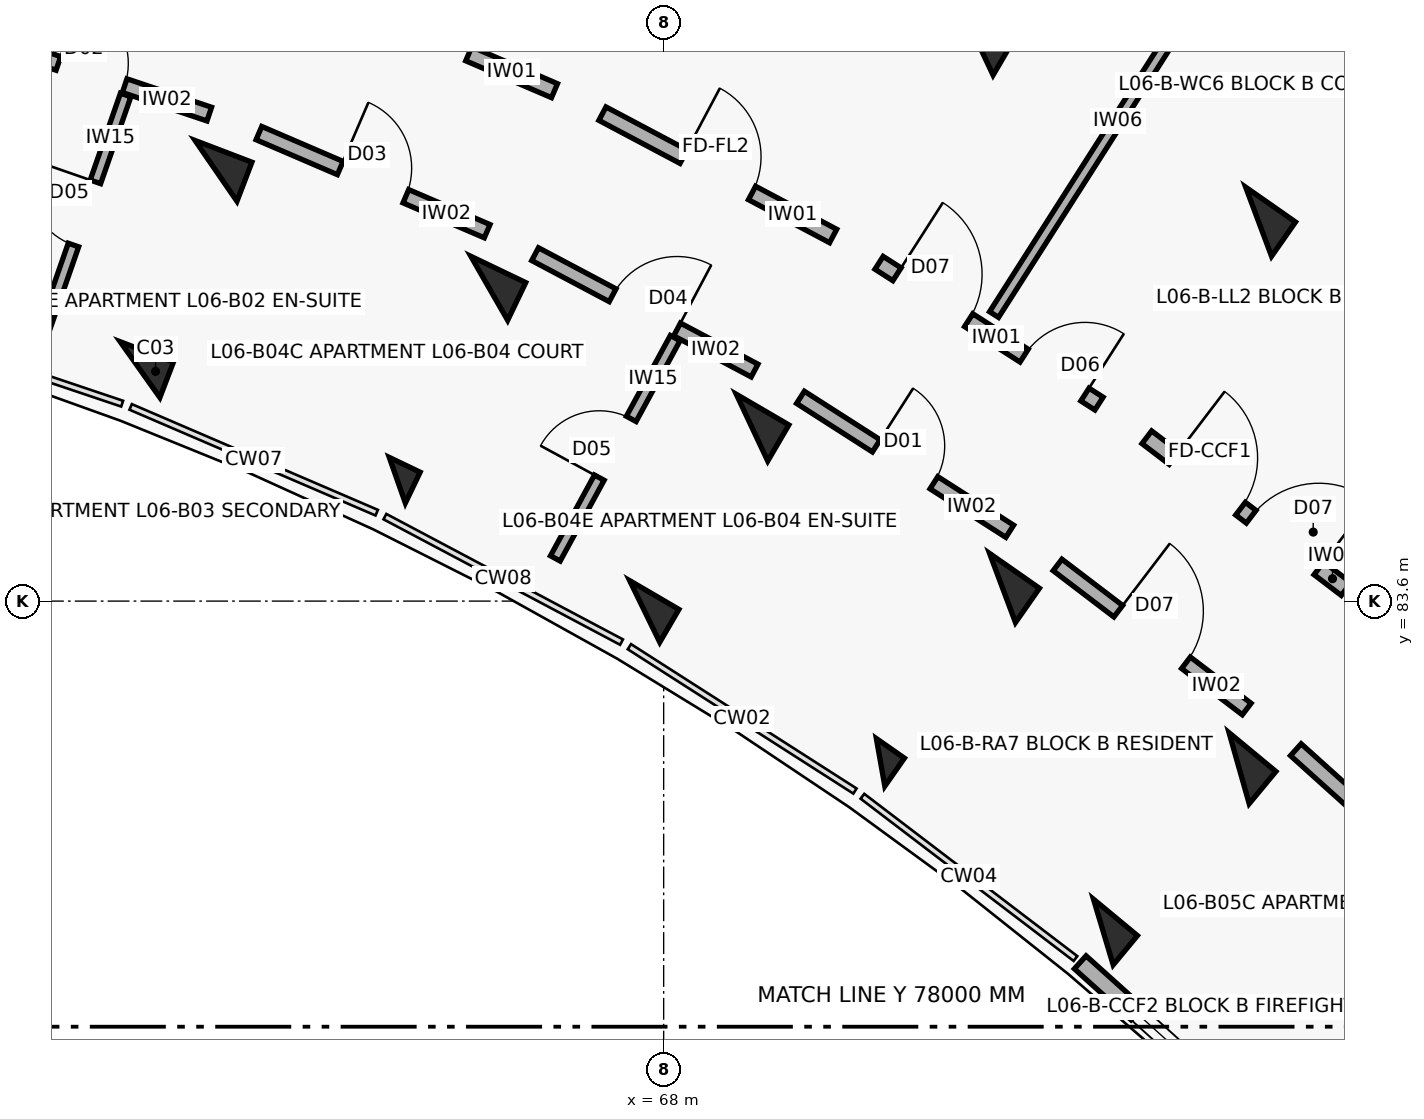
"""IFC4 building model, lengths in metres.
Left out: names, types, materials, properties, quantities, classifications, styles, units other than length and angle.
Written with IfcOpenShell. Run it as: python <this file> out.ifc"""

import sys

from ifc_helpers import new_model, si_unit, direction, frame, frame_2d, origin, origin_2d, place, context, subcontext, project, spatial, rectangle, extrude, element, fill, save


model = new_model("IFC4")
c1 = context("Model", 3, precision=1e-05, world=origin(), true_north=direction((0.0, 1.0)))
c2 = subcontext(c1, "Body", "Model", "MODEL_VIEW")
j1 = project(units=[si_unit("LENGTHUNIT", "METRE"), si_unit("PLANEANGLEUNIT", "RADIAN")], contexts=[c1])
p1 = place(None, origin())
s1 = spatial("IfcSite", under=j1, at=p1, CompositionType="ELEMENT")
p2 = place(p1, origin())
s2 = spatial("IfcBuilding", under=s1, at=p2, CompositionType="ELEMENT")
p3 = place(p2, frame((0.0, 0.0, 20.5)))
s3 = spatial("IfcBuildingStorey", under=s2, at=p3, CompositionType="ELEMENT", Elevation=20.5)
p4 = place(p3, frame((61.111, 86.646, 0.0), z_axis=(0.0, 0.0, 1.0), x_axis=(0.357064076459, 0.934079892355, 0.0)))
e1 = element("IfcColumn", 1, at=p4, inside=s3, PredefinedType="COLUMN", context=c2, shape_type="SweptSolid", body=[
    extrude(rectangle(XDim=0.5, YDim=0.75, at=origin_2d()), origin(), (0.0, 0.0, 1.0), 3.1),
])
p5 = place(p3, frame((62.111, 89.261, 0.0), z_axis=(0.0, 0.0, 1.0), x_axis=(0.357064076459, 0.934079892355, 0.0)))
e2 = element("IfcColumn", 2, at=p5, inside=s3, PredefinedType="COLUMN", context=c2, shape_type="SweptSolid", body=[
    extrude(rectangle(XDim=0.55, YDim=0.8, at=origin_2d()), origin(), (0.0, 0.0, 1.0), 3.1),
])
p6 = place(p3, frame((64.496, 85.191, 0.0), z_axis=(0.0, 0.0, 1.0), x_axis=(0.432085748802, 0.901832526405, 0.0)))
e3 = element("IfcColumn", 3, at=p6, inside=s3, PredefinedType="COLUMN", context=c2, shape_type="SweptSolid", body=[
    extrude(rectangle(XDim=0.45, YDim=0.45, at=origin_2d()), origin(), (0.0, 0.0, 1.0), 3.1),
])
p7 = place(p3, frame((65.706, 87.716, 0.0), z_axis=(0.0, 0.0, 1.0), x_axis=(0.432085748802, 0.901832526405, 0.0)))
e4 = element("IfcColumn", 4, at=p7, inside=s3, PredefinedType="COLUMN", context=c2, shape_type="SweptSolid", body=[
    extrude(rectangle(XDim=0.55, YDim=0.8, at=origin_2d()), origin(), (0.0, 0.0, 1.0), 3.1),
])
p8 = place(p3, frame((67.751, 83.464, 0.0), z_axis=(0.0, 0.0, 1.0), x_axis=(0.504226211181, 0.863571611366, 0.0)))
e5 = element("IfcColumn", 5, at=p8, inside=s3, PredefinedType="COLUMN", context=c2, shape_type="SweptSolid", body=[
    extrude(rectangle(XDim=0.5, YDim=0.75, at=origin_2d()), origin(), (0.0, 0.0, 1.0), 3.1),
])
for number, where, z_axis, x_axis in (
    (6, (69.163, 85.882, 0.0), (0.0, 0.0, 1.0), (0.504, 0.864, 0.0)),
    (7, (72.127, 90.96, 0.0), (0.0, 0.0, 1.0), (0.504, 0.864, 0.0)),
):
    element("IfcColumn", number, at=place(p3, frame(where, z_axis=z_axis, x_axis=x_axis)), inside=s3, PredefinedType="COLUMN", context=c2, shape_type="SweptSolid", body=[
        extrude(rectangle(XDim=0.55, YDim=0.8, at=origin_2d()), origin(), (0.0, 0.0, 1.0), 3.1),
    ])
p9 = place(p3, frame((70.854, 81.478, 0.0), z_axis=(0.0, 0.0, 1.0), x_axis=(0.573004420611, 0.819552276527, 0.0)))
e8 = element("IfcColumn", 8, at=p9, inside=s3, PredefinedType="COLUMN", context=c2, shape_type="SweptSolid", body=[
    extrude(rectangle(XDim=0.45, YDim=0.45, at=origin_2d()), origin(), (0.0, 0.0, 1.0), 3.1),
])
for number, where, z_axis, x_axis in (
    (9, (72.458, 83.773, 0.0), (0.0, 0.0, 1.0), (0.573, 0.82, 0.0)),
    (10, (75.828, 88.592, 0.0), (0.0, 0.0, 1.0), (0.573, 0.82, 0.0)),
):
    element("IfcColumn", number, at=place(p3, frame(where, z_axis=z_axis, x_axis=x_axis)), inside=s3, PredefinedType="COLUMN", context=c2, shape_type="SweptSolid", body=[
        extrude(rectangle(XDim=0.55, YDim=0.8, at=origin_2d()), origin(), (0.0, 0.0, 1.0), 3.1),
    ])
p10 = place(p3, frame((73.785, 79.245, 0.0), z_axis=(0.0, 0.0, 1.0), x_axis=(0.637961754089, 0.770068049148, 0.0)))
e11 = element("IfcColumn", 11, at=p10, inside=s3, PredefinedType="COLUMN", context=c2, shape_type="SweptSolid", body=[
    extrude(rectangle(XDim=0.5, YDim=0.75, at=origin_2d()), origin(), (0.0, 0.0, 1.0), 3.1),
])
p11 = place(p3, frame((75.571, 81.402, 0.0), z_axis=(0.0, 0.0, 1.0), x_axis=(0.637961754089, 0.770068049148, 0.0)))
e12 = element("IfcColumn", 12, at=p11, inside=s3, PredefinedType="COLUMN", context=c2, shape_type="SweptSolid", body=[
    extrude(rectangle(XDim=0.55, YDim=0.8, at=origin_2d()), origin(), (0.0, 0.0, 1.0), 3.1),
])
p12 = place(p3, frame((73.481, 78.847, 0.0), z_axis=(0.0, 0.0, 1.0), x_axis=(0.743385092197, -0.668863666751, 0.0)))
e13 = element("IfcWall", 13, at=p12, inside=s3, PredefinedType="SOLIDWALL", context=c2, shape_type="SweptSolid", body=[
    extrude(rectangle(XDim=3.604, YDim=0.23, at=frame_2d((1.802, 0.0))), origin(), (0.0, 0.0, 1.0), 2.25),
])
p13 = place(p12, frame((1.002, 0.0, 0.32)))
e14 = element("IfcOpeningElement", 14, at=p13, cuts=e13, PredefinedType="OPENING", context=c2, shape_type="SweptSolid", body=[
    extrude(rectangle(XDim=1.6, YDim=1.5, at=frame_2d((0.8, 0.75))), frame((0.0, 0.125, 0.0), z_axis=(0.0, -1.0, 0.0), x_axis=(1.0, 0.0, 0.0)), (0.0, 0.0, 1.0), 0.25),
])
p14 = place(p3, frame((58.923, 91.049, 0.0), z_axis=(0.0, 0.0, 1.0), x_axis=(0.94787351033, -0.318646839643, 0.0)))
e15 = element("IfcWall", 15, at=p14, inside=s3, PredefinedType="SOLIDWALL", context=c2, shape_type="SweptSolid", body=[
    extrude(rectangle(XDim=3.269, YDim=0.19, at=frame_2d((1.634, 0.0))), origin(), (0.0, 0.0, 1.0), 2.08),
])
p15 = place(p14, frame((1.174, 0.0, 0.0)))
e16 = element("IfcOpeningElement", 16, at=p15, cuts=e15, PredefinedType="OPENING", context=c2, shape_type="SweptSolid", body=[
    extrude(rectangle(XDim=0.92, YDim=2.1, at=frame_2d((0.46, 1.05))), frame((0.0, 0.105, 0.0), z_axis=(0.0, -1.0, 0.0), x_axis=(1.0, 0.0, 0.0)), (0.0, 0.0, 1.0), 0.21),
])
p16 = place(p3, frame((59.837, 87.143, 0.0), z_axis=(0.0, 0.0, 1.0), x_axis=(0.328629662527, 0.944458863534, 0.0)))
e17 = element("IfcWall", 17, at=p16, inside=s3, PredefinedType="PARTITIONING", context=c2, shape_type="SweptSolid", body=[
    extrude(rectangle(XDim=3.3, YDim=0.145, at=frame_2d((1.65, 0.0))), origin(), (0.0, 0.0, 1.0), 2.08),
])
p17 = place(p16, frame((1.21, 0.0, 0.0)))
e18 = element("IfcOpeningElement", 18, at=p17, cuts=e17, PredefinedType="OPENING", context=c2, shape_type="SweptSolid", body=[
    extrude(rectangle(XDim=0.88, YDim=2.1, at=frame_2d((0.44, 1.05))), frame((0.0, 0.083, 0.0), z_axis=(0.0, -1.0, 0.0), x_axis=(1.0, 0.0, 0.0)), (0.0, 0.0, 1.0), 0.165),
])
p18 = place(p3, frame((63.407, 91.673, 0.0), z_axis=(0.0, 0.0, 1.0), x_axis=(0.918718172399, -0.394913813008, 0.0)))
e19 = element("IfcWall", 19, at=p18, inside=s3, PredefinedType="SOLIDWALL", context=c2, shape_type="SweptSolid", body=[
    extrude(rectangle(XDim=3.436, YDim=0.2, at=frame_2d((1.718, 0.0))), origin(), (0.0, 0.0, 1.0), 2.08),
])
p19 = place(p18, frame((1.228, 0.0, 0.0)))
e20 = element("IfcOpeningElement", 20, at=p19, cuts=e19, PredefinedType="OPENING", context=c2, shape_type="SweptSolid", body=[
    extrude(rectangle(XDim=0.98, YDim=2.15, at=frame_2d((0.49, 1.075))), frame((0.0, 0.11, 0.0), z_axis=(0.0, -1.0, 0.0), x_axis=(1.0, 0.0, 0.0)), (0.0, 0.0, 1.0), 0.22),
])
p20 = place(p3, frame((62.675, 89.758, 0.0), z_axis=(0.0, 0.0, 1.0), x_axis=(0.918723391052, -0.394901672235, 0.0)))
e21 = element("IfcWall", 21, at=p20, inside=s3, PredefinedType="SOLIDWALL", context=c2, shape_type="SweptSolid", body=[
    extrude(rectangle(XDim=3.269, YDim=0.19, at=frame_2d((1.634, 0.0))), origin(), (0.0, 0.0, 1.0), 2.08),
])
p21 = place(p20, frame((1.164, 0.0, 0.0)))
e22 = element("IfcOpeningElement", 22, at=p21, cuts=e21, PredefinedType="OPENING", context=c2, shape_type="SweptSolid", body=[
    extrude(rectangle(XDim=0.94, YDim=2.1, at=frame_2d((0.47, 1.05))), frame((0.0, 0.105, 0.0), z_axis=(0.0, -1.0, 0.0), x_axis=(1.0, 0.0, 0.0)), (0.0, 0.0, 1.0), 0.21),
])
p22 = place(p3, frame((67.194, 90.014, 0.0), z_axis=(0.0, 0.0, 1.0), x_axis=(0.883410853063, -0.468599258099, 0.0)))
e23 = element("IfcWall", 23, at=p22, inside=s3, PredefinedType="SOLIDWALL", context=c2, shape_type="SweptSolid", body=[
    extrude(rectangle(XDim=3.436, YDim=0.2, at=frame_2d((1.718, 0.0))), origin(), (0.0, 0.0, 1.0), 2.08),
])
p23 = place(p22, frame((1.208, 0.0, 0.0)))
e24 = element("IfcOpeningElement", 24, at=p23, cuts=e23, PredefinedType="OPENING", context=c2, shape_type="SweptSolid", body=[
    extrude(rectangle(XDim=1.02, YDim=2.15, at=frame_2d((0.51, 1.075))), frame((0.0, 0.11, 0.0), z_axis=(0.0, -1.0, 0.0), x_axis=(1.0, 0.0, 0.0)), (0.0, 0.0, 1.0), 0.22),
])
p24 = place(p3, frame((66.309, 88.165, 0.0), z_axis=(0.0, 0.0, 1.0), x_axis=(0.883444301944, -0.468536194293, 0.0)))
e25 = element("IfcWall", 25, at=p24, inside=s3, PredefinedType="SOLIDWALL", context=c2, shape_type="SweptSolid", body=[
    extrude(rectangle(XDim=3.269, YDim=0.19, at=frame_2d((1.634, 0.0))), origin(), (0.0, 0.0, 1.0), 2.08),
])
p25 = place(p24, frame((1.154, 0.0, 0.0)))
e26 = element("IfcOpeningElement", 26, at=p25, cuts=e25, PredefinedType="OPENING", context=c2, shape_type="SweptSolid", body=[
    extrude(rectangle(XDim=0.96, YDim=2.1, at=frame_2d((0.48, 1.05))), frame((0.0, 0.105, 0.0), z_axis=(0.0, -1.0, 0.0), x_axis=(1.0, 0.0, 0.0)), (0.0, 0.0, 1.0), 0.21),
])
p26 = place(p3, frame((66.575, 84.162, 0.0), z_axis=(0.0, 0.0, 1.0), x_axis=(0.477841058477, 0.878446311868, 0.0)))
e27 = element("IfcWall", 27, at=p26, inside=s3, PredefinedType="PARTITIONING", context=c2, shape_type="SweptSolid", body=[
    extrude(rectangle(XDim=3.3, YDim=0.145, at=frame_2d((1.65, 0.0))), origin(), (0.0, 0.0, 1.0), 2.08),
])
p27 = place(p26, frame((1.21, 0.0, 0.0)))
e28 = element("IfcOpeningElement", 28, at=p27, cuts=e27, PredefinedType="OPENING", context=c2, shape_type="SweptSolid", body=[
    extrude(rectangle(XDim=0.88, YDim=2.1, at=frame_2d((0.44, 1.05))), frame((0.0, 0.083, 0.0), z_axis=(0.0, -1.0, 0.0), x_axis=(1.0, 0.0, 0.0)), (0.0, 0.0, 1.0), 0.165),
])
p28 = place(p3, frame((70.834, 88.051, 0.0), z_axis=(0.0, 0.0, 1.0), x_axis=(0.842257205985, -0.539075874963, 0.0)))
e29 = element("IfcWall", 29, at=p28, inside=s3, PredefinedType="SOLIDWALL", context=c2, shape_type="SweptSolid", body=[
    extrude(rectangle(XDim=3.436, YDim=0.2, at=frame_2d((1.718, 0.0))), origin(), (0.0, 0.0, 1.0), 2.08),
])
p29 = place(p28, frame((0.28, 0.0, 0.0)))
e30 = element("IfcOpeningElement", 30, at=p29, cuts=e29, PredefinedType="OPENING", context=c2, shape_type="SweptSolid", body=[
    extrude(rectangle(XDim=1.12, YDim=2.15, at=frame_2d((0.56, 1.075))), frame((0.0, 0.11, 0.0), z_axis=(0.0, -1.0, 0.0), x_axis=(1.0, 0.0, 0.0)), (0.0, 0.0, 1.0), 0.22),
])
p30 = place(p28, frame((2.266, 0.0, 0.0)))
e31 = element("IfcOpeningElement", 31, at=p30, cuts=e29, PredefinedType="OPENING", context=c2, shape_type="SweptSolid", body=[
    extrude(rectangle(XDim=0.95, YDim=2.1, at=frame_2d((0.475, 1.05))), frame((0.0, 0.11, 0.0), z_axis=(0.0, -1.0, 0.0), x_axis=(1.0, 0.0, 0.0)), (0.0, 0.0, 1.0), 0.22),
])
p31 = place(p3, frame((69.8, 86.281, 0.0), z_axis=(0.0, 0.0, 1.0), x_axis=(0.842225276846, -0.539125758095, 0.0)))
e32 = element("IfcWall", 32, at=p31, inside=s3, PredefinedType="SOLIDWALL", context=c2, shape_type="SweptSolid", body=[
    extrude(rectangle(XDim=3.269, YDim=0.19, at=frame_2d((1.634, 0.0))), origin(), (0.0, 0.0, 1.0), 2.08),
])
p32 = place(p31, frame((1.184, 0.0, 0.0)))
e33 = element("IfcOpeningElement", 33, at=p32, cuts=e32, PredefinedType="OPENING", context=c2, shape_type="SweptSolid", body=[
    extrude(rectangle(XDim=0.9, YDim=2.1, at=frame_2d((0.45, 1.05))), frame((0.0, 0.105, 0.0), z_axis=(0.0, -1.0, 0.0), x_axis=(1.0, 0.0, 0.0)), (0.0, 0.0, 1.0), 0.21),
])
p33 = place(p3, frame((72.347, 87.37, 0.0), z_axis=(0.0, 0.0, 1.0), x_axis=(0.537777309481, 0.843086926365, 0.0)))
e34 = element("IfcWall", 34, at=p33, inside=s3, PredefinedType="PARTITIONING", context=c2, shape_type="SweptSolid", body=[
    extrude(rectangle(XDim=7.95, YDim=0.14, at=frame_2d((3.975, 0.0))), origin(), (0.0, 0.0, 1.0), 2.08),
])
p34 = place(p33, frame((6.05, 0.0, 0.0)))
e35 = element("IfcOpeningElement", 35, at=p34, cuts=e34, PredefinedType="OPENING", context=c2, shape_type="SweptSolid", body=[
    extrude(rectangle(XDim=0.92, YDim=2.1, at=frame_2d((0.46, 1.05))), frame((0.0, 0.08, 0.0), z_axis=(0.0, -1.0, 0.0), x_axis=(1.0, 0.0, 0.0)), (0.0, 0.0, 1.0), 0.16),
])
p35 = place(p3, frame((74.357, 85.756, 0.0), z_axis=(0.0, 0.0, 1.0), x_axis=(0.795498026433, -0.605956178235, 0.0)))
e36 = element("IfcWall", 36, at=p35, inside=s3, PredefinedType="SOLIDWALL", context=c2, shape_type="SweptSolid", body=[
    extrude(rectangle(XDim=3.296, YDim=0.21, at=frame_2d((1.648, 0.0))), origin(), (0.0, 0.0, 1.0), 2.08),
])
p36 = place(p35, frame((0.45, 0.0, 0.0)))
e37 = element("IfcOpeningElement", 37, at=p36, cuts=e36, PredefinedType="OPENING", context=c2, shape_type="SweptSolid", body=[
    extrude(rectangle(XDim=1.1, YDim=2.15, at=frame_2d((0.55, 1.075))), frame((0.0, 0.115, 0.0), z_axis=(0.0, -1.0, 0.0), x_axis=(1.0, 0.0, 0.0)), (0.0, 0.0, 1.0), 0.23),
])
p37 = place(p35, frame((1.726, 0.0, 0.0)))
e38 = element("IfcOpeningElement", 38, at=p37, cuts=e36, PredefinedType="OPENING", context=c2, shape_type="SweptSolid", body=[
    extrude(rectangle(XDim=1.12, YDim=2.15, at=frame_2d((0.56, 1.075))), frame((0.0, 0.115, 0.0), z_axis=(0.0, -1.0, 0.0), x_axis=(1.0, 0.0, 0.0)), (0.0, 0.0, 1.0), 0.23),
])
p38 = place(p3, frame((73.182, 84.076, 0.0), z_axis=(0.0, 0.0, 1.0), x_axis=(0.795501577908, -0.605951515838, 0.0)))
e39 = element("IfcWall", 39, at=p38, inside=s3, PredefinedType="SOLIDWALL", context=c2, shape_type="SweptSolid", body=[
    extrude(rectangle(XDim=3.129, YDim=0.19, at=frame_2d((1.564, 0.0))), origin(), (0.0, 0.0, 1.0), 2.08),
])
p39 = place(p38, frame((1.004, 0.0, 0.0)))
e40 = element("IfcOpeningElement", 40, at=p39, cuts=e39, PredefinedType="OPENING", context=c2, shape_type="SweptSolid", body=[
    extrude(rectangle(XDim=1.12, YDim=2.15, at=frame_2d((0.56, 1.075))), frame((0.0, 0.105, 0.0), z_axis=(0.0, -1.0, 0.0), x_axis=(1.0, 0.0, 0.0)), (0.0, 0.0, 1.0), 0.21),
])
p40 = place(p3, frame((76.317, 81.644, 0.0), z_axis=(0.0, 0.0, 1.0), x_axis=(0.743387266925, -0.668861249718, 0.0)))
e41 = element("IfcWall", 41, at=p40, inside=s3, PredefinedType="SOLIDWALL", context=c2, shape_type="SweptSolid", body=[
    extrude(rectangle(XDim=3.128, YDim=0.21, at=frame_2d((1.564, 0.0))), origin(), (0.0, 0.0, 1.0), 2.08),
])
p41 = place(p40, frame((1.014, 0.0, 0.0)))
e42 = element("IfcOpeningElement", 42, at=p41, cuts=e41, PredefinedType="OPENING", context=c2, shape_type="SweptSolid", body=[
    extrude(rectangle(XDim=1.1, YDim=2.15, at=frame_2d((0.55, 1.075))), frame((0.0, 0.115, 0.0), z_axis=(0.0, -1.0, 0.0), x_axis=(1.0, 0.0, 0.0)), (0.0, 0.0, 1.0), 0.23),
])
p42 = place(p13, origin())
e43 = element("IfcWindow", 43, at=p42, inside=s3, PartitioningType="DOUBLE_PANEL_VERTICAL", PredefinedType="WINDOW", context=c2, shape_type="SweptSolid", body=[
    extrude(rectangle(XDim=1.6, YDim=1.5, at=frame_2d((0.8, 0.75))), frame((0.0, 0.03, 0.0), z_axis=(0.0, -1.0, 0.0), x_axis=(1.0, 0.0, 0.0)), (0.0, 0.0, 1.0), 0.06),
])
fill(e14, e43)
p43 = place(p15, origin())
e44 = element("IfcDoor", 44, at=p43, inside=s3, OperationType="SINGLE_SWING_LEFT", PredefinedType="DOOR", context=c2, shape_type="SweptSolid", body=[
    extrude(rectangle(XDim=0.92, YDim=2.1, at=frame_2d((0.46, 1.05))), frame((0.0, 0.025, 0.0), z_axis=(0.0, -1.0, 0.0), x_axis=(1.0, 0.0, 0.0)), (0.0, 0.0, 1.0), 0.05),
])
fill(e16, e44)
p44 = place(p17, origin())
e45 = element("IfcDoor", 45, at=p44, inside=s3, OperationType="SINGLE_SWING_RIGHT", PredefinedType="DOOR", context=c2, shape_type="SweptSolid", body=[
    extrude(rectangle(XDim=0.88, YDim=2.1, at=frame_2d((0.44, 1.05))), frame((0.0, 0.025, 0.0), z_axis=(0.0, -1.0, 0.0), x_axis=(1.0, 0.0, 0.0)), (0.0, 0.0, 1.0), 0.05),
])
fill(e18, e45)
p45 = place(p19, origin())
e46 = element("IfcDoor", 46, at=p45, inside=s3, OperationType="SINGLE_SWING_RIGHT", PredefinedType="DOOR", context=c2, shape_type="SweptSolid", body=[
    extrude(rectangle(XDim=0.98, YDim=2.15, at=frame_2d((0.49, 1.075))), frame((0.0, 0.025, 0.0), z_axis=(0.0, -1.0, 0.0), x_axis=(1.0, 0.0, 0.0)), (0.0, 0.0, 1.0), 0.05),
])
fill(e20, e46)
p46 = place(p21, origin())
e47 = element("IfcDoor", 47, at=p46, inside=s3, OperationType="SINGLE_SWING_LEFT", PredefinedType="DOOR", context=c2, shape_type="SweptSolid", body=[
    extrude(rectangle(XDim=0.94, YDim=2.1, at=frame_2d((0.47, 1.05))), frame((0.0, 0.025, 0.0), z_axis=(0.0, -1.0, 0.0), x_axis=(1.0, 0.0, 0.0)), (0.0, 0.0, 1.0), 0.05),
])
fill(e22, e47)
p47 = place(p23, origin())
e48 = element("IfcDoor", 48, at=p47, inside=s3, OperationType="SINGLE_SWING_LEFT", PredefinedType="DOOR", context=c2, shape_type="SweptSolid", body=[
    extrude(rectangle(XDim=1.02, YDim=2.15, at=frame_2d((0.51, 1.075))), frame((0.0, 0.025, 0.0), z_axis=(0.0, -1.0, 0.0), x_axis=(1.0, 0.0, 0.0)), (0.0, 0.0, 1.0), 0.05),
])
fill(e24, e48)
p48 = place(p25, origin())
e49 = element("IfcDoor", 49, at=p48, inside=s3, OperationType="SINGLE_SWING_RIGHT", PredefinedType="DOOR", context=c2, shape_type="SweptSolid", body=[
    extrude(rectangle(XDim=0.96, YDim=2.1, at=frame_2d((0.48, 1.05))), frame((0.0, 0.025, 0.0), z_axis=(0.0, -1.0, 0.0), x_axis=(1.0, 0.0, 0.0)), (0.0, 0.0, 1.0), 0.05),
])
fill(e26, e49)
p49 = place(p27, origin())
e50 = element("IfcDoor", 50, at=p49, inside=s3, OperationType="SINGLE_SWING_LEFT", PredefinedType="DOOR", context=c2, shape_type="SweptSolid", body=[
    extrude(rectangle(XDim=0.88, YDim=2.1, at=frame_2d((0.44, 1.05))), frame((0.0, 0.025, 0.0), z_axis=(0.0, -1.0, 0.0), x_axis=(1.0, 0.0, 0.0)), (0.0, 0.0, 1.0), 0.05),
])
fill(e28, e50)
p50 = place(p29, origin())
e51 = element("IfcDoor", 51, at=p50, inside=s3, OperationType="SINGLE_SWING_LEFT", PredefinedType="DOOR", context=c2, shape_type="SweptSolid", body=[
    extrude(rectangle(XDim=1.12, YDim=2.15, at=frame_2d((0.56, 1.075))), frame((0.0, 0.025, 0.0), z_axis=(0.0, -1.0, 0.0), x_axis=(1.0, 0.0, 0.0)), (0.0, 0.0, 1.0), 0.05),
])
fill(e30, e51)
p51 = place(p30, origin())
e52 = element("IfcDoor", 52, at=p51, inside=s3, OperationType="SINGLE_SWING_RIGHT", PredefinedType="DOOR", context=c2, shape_type="SweptSolid", body=[
    extrude(rectangle(XDim=0.95, YDim=2.1, at=frame_2d((0.475, 1.05))), frame((0.0, 0.025, 0.0), z_axis=(0.0, -1.0, 0.0), x_axis=(1.0, 0.0, 0.0)), (0.0, 0.0, 1.0), 0.05),
])
fill(e31, e52)
p52 = place(p32, origin())
e53 = element("IfcDoor", 53, at=p52, inside=s3, OperationType="SINGLE_SWING_LEFT", PredefinedType="DOOR", context=c2, shape_type="SweptSolid", body=[
    extrude(rectangle(XDim=0.9, YDim=2.1, at=frame_2d((0.45, 1.05))), frame((0.0, 0.025, 0.0), z_axis=(0.0, -1.0, 0.0), x_axis=(1.0, 0.0, 0.0)), (0.0, 0.0, 1.0), 0.05),
])
fill(e33, e53)
p53 = place(p36, origin())
e54 = element("IfcDoor", 54, at=p53, inside=s3, OperationType="SINGLE_SWING_LEFT", PredefinedType="DOOR", context=c2, shape_type="SweptSolid", body=[
    extrude(rectangle(XDim=1.1, YDim=2.15, at=frame_2d((0.55, 1.075))), frame((0.0, 0.025, 0.0), z_axis=(0.0, -1.0, 0.0), x_axis=(1.0, 0.0, 0.0)), (0.0, 0.0, 1.0), 0.05),
])
fill(e37, e54)
p54 = place(p37, origin())
e55 = element("IfcDoor", 55, at=p54, inside=s3, OperationType="SINGLE_SWING_RIGHT", PredefinedType="DOOR", context=c2, shape_type="SweptSolid", body=[
    extrude(rectangle(XDim=1.12, YDim=2.15, at=frame_2d((0.56, 1.075))), frame((0.0, 0.025, 0.0), z_axis=(0.0, -1.0, 0.0), x_axis=(1.0, 0.0, 0.0)), (0.0, 0.0, 1.0), 0.05),
])
fill(e38, e55)
p55 = place(p39, origin())
e56 = element("IfcDoor", 56, at=p55, inside=s3, OperationType="SINGLE_SWING_LEFT", PredefinedType="DOOR", context=c2, shape_type="SweptSolid", body=[
    extrude(rectangle(XDim=1.12, YDim=2.15, at=frame_2d((0.56, 1.075))), frame((0.0, 0.025, 0.0), z_axis=(0.0, -1.0, 0.0), x_axis=(1.0, 0.0, 0.0)), (0.0, 0.0, 1.0), 0.05),
])
fill(e40, e56)
save(model, sys.argv[1])
